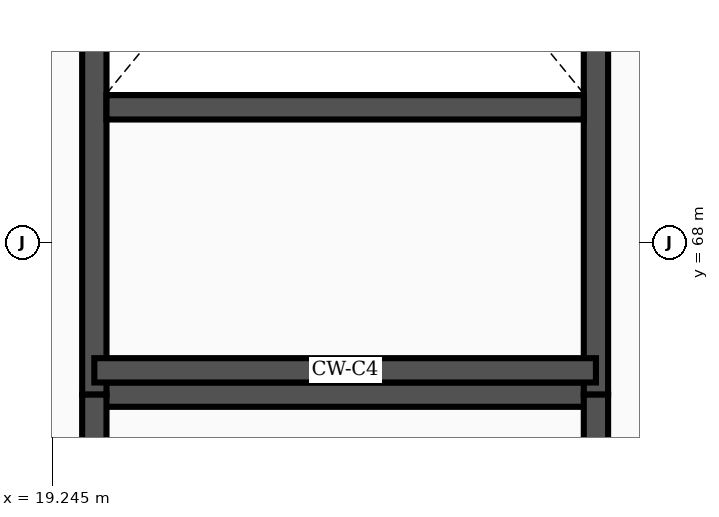
"""IFC4 building model, lengths in metres.
Left out: names, types, materials, properties, quantities, classifications, styles, units other than length and angle.
Written with IfcOpenShell. Run it as: python <this file> out.ifc"""

import sys

from ifc_helpers import new_model, si_unit, direction, frame, frame_2d, origin, place, context, subcontext, project, spatial, rectangle, extrude, element, save


model = new_model("IFC4")
c1 = context("Model", 3, precision=1e-05, world=origin(), true_north=direction((0.0, 1.0)))
c2 = subcontext(c1, "Body", "Model", "MODEL_VIEW")
j1 = project(units=[si_unit("LENGTHUNIT", "METRE"), si_unit("PLANEANGLEUNIT", "RADIAN")], contexts=[c1])
p1 = place(None, origin())
s1 = spatial("IfcSite", under=j1, at=p1, CompositionType="ELEMENT")
p2 = place(p1, origin())
s2 = spatial("IfcBuilding", under=s1, at=p2, CompositionType="ELEMENT")
p3 = place(p2, origin())
s3 = spatial("IfcBuildingStorey", under=s2, at=p3, CompositionType="ELEMENT", Elevation=0.0)
p4 = place(p3, frame((19.8, 66.0, 0.0), z_axis=(0.0, 0.0, 1.0), x_axis=(1.0, 0.0, 0.0)))
e1 = element("IfcWall", 1, at=p4, inside=s3, PredefinedType="SHEAR", context=c2, shape_type="SweptSolid", body=[
    extrude(rectangle(XDim=6.6, YDim=0.32, at=frame_2d((3.3, 0.0))), origin(), (0.0, 0.0, 1.0), 5.75),
])
for number, where, z_axis, x_axis in (
    (2, (19.8, 66.0, 0.0), (0.0, 0.0, 1.0), (0.0, 1.0, 0.0)),
    (3, (26.4, 66.0, 0.0), (0.0, 0.0, 1.0), (0.0, 1.0, 0.0)),
):
    element("IfcWall", number, at=place(p3, frame(where, z_axis=z_axis, x_axis=x_axis)), inside=s3, PredefinedType="SHEAR", context=c2, shape_type="SweptSolid", body=[
        extrude(rectangle(XDim=14.6, YDim=0.32, at=frame_2d((7.3, 0.0))), origin(), (0.0, 0.0, 1.0), 5.75),
    ])
p5 = place(p3, frame((19.96, 69.78, 0.0), z_axis=(0.0, 0.0, 1.0), x_axis=(1.0, 0.0, 0.0)))
e4 = element("IfcWall", 4, at=p5, inside=s3, PredefinedType="SHEAR", context=c2, shape_type="SweptSolid", body=[
    extrude(rectangle(XDim=6.28, YDim=0.32, at=frame_2d((3.14, 0.0))), origin(), (0.0, 0.0, 1.0), 5.75),
])
p6 = place(p3, frame((19.8, 66.32, 0.0), z_axis=(0.0, 0.0, 1.0), x_axis=(1.0, 0.0, 0.0)))
e5 = element("IfcWall", 5, at=p6, inside=s3, PredefinedType="SHEAR", context=c2, shape_type="SweptSolid", body=[
    extrude(rectangle(XDim=6.6, YDim=0.32, at=frame_2d((3.3, 0.0))), origin(), (0.0, 0.0, 1.0), 5.75),
])
p7 = place(p3, frame((19.8, 54.0, 0.0), z_axis=(0.0, 0.0, 1.0), x_axis=(0.0, 1.0, 0.0)))
e6 = element("IfcWall", 6, at=p7, inside=s3, PredefinedType="SHEAR", context=c2, shape_type="SweptSolid", body=[
    extrude(rectangle(XDim=12.0, YDim=0.32, at=frame_2d((6.0, 0.0))), origin(), (0.0, 0.0, 1.0), 5.75),
])
p8 = place(p3, frame((26.4, 54.0, 0.0), z_axis=(0.0, 0.0, 1.0), x_axis=(0.0, 1.0, 0.0)))
e7 = element("IfcWall", 7, at=p8, inside=s3, PredefinedType="SHEAR", context=c2, shape_type="SweptSolid", body=[
    extrude(rectangle(XDim=12.0, YDim=0.32, at=frame_2d((6.0, 0.0))), origin(), (0.0, 0.0, 1.0), 5.75),
])
p9 = place(p8, frame((0.55, 0.0, 0.0)))
e8 = element("IfcOpeningElement", 8, at=p9, cuts=e7, PredefinedType="OPENING", context=c2, shape_type="SweptSolid", body=[
    extrude(rectangle(XDim=3.0, YDim=2.25, at=frame_2d((1.5, 1.125))), frame((0.0, 0.172, 0.0), z_axis=(0.0, -1.0, 0.0), x_axis=(1.0, 0.0, 0.0)), (0.0, 0.0, 1.0), 0.344),
])
save(model, sys.argv[1])
